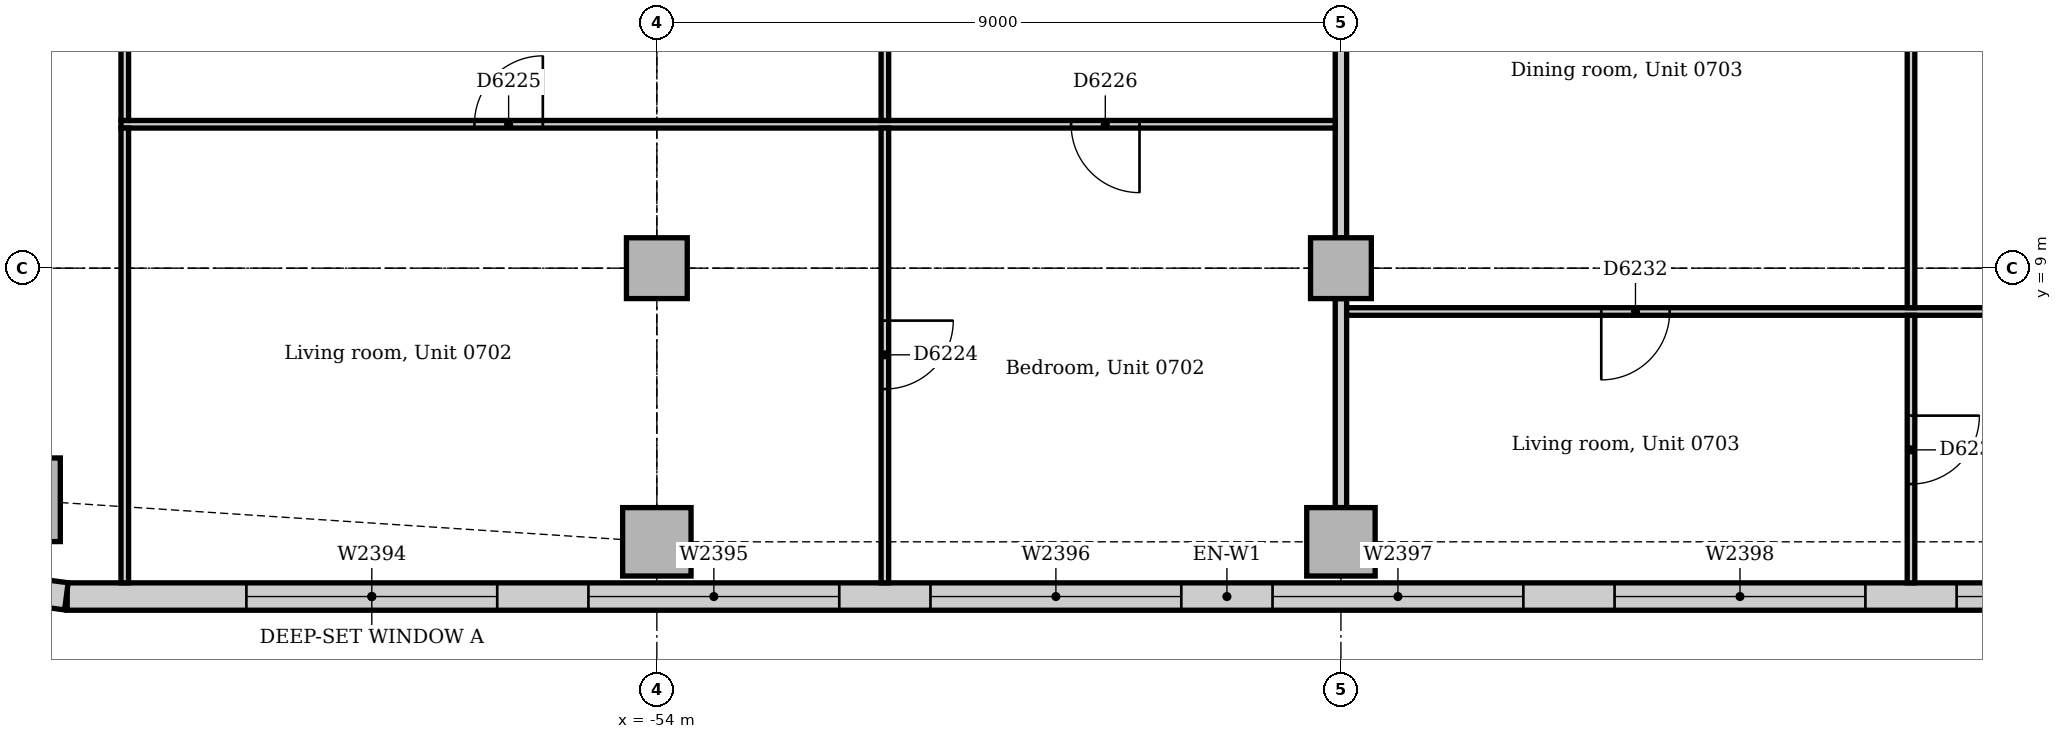
"""IFC4 building model, lengths in metres.
Left out: names, types, materials, properties, quantities, classifications, styles, units other than length and angle.
Written with IfcOpenShell. Run it as: python <this file> out.ifc"""

import sys

from ifc_helpers import new_model, si_unit, direction, frame, frame_2d, origin, origin_2d, place, context, subcontext, project, spatial, rectangle, extrude, element, fill, save


model = new_model("IFC4")
c1 = context("Model", 3, precision=1e-05, world=origin(), true_north=direction((0.0, 1.0)))
c2 = subcontext(c1, "Body", "Model", "MODEL_VIEW")
j1 = project(units=[si_unit("LENGTHUNIT", "METRE"), si_unit("PLANEANGLEUNIT", "RADIAN")], contexts=[c1])
p1 = place(None, origin())
s1 = spatial("IfcSite", under=j1, at=p1, CompositionType="ELEMENT")
p2 = place(p1, origin())
s2 = spatial("IfcBuilding", under=s1, at=p2, CompositionType="ELEMENT")
p3 = place(p2, frame((0.0, 0.0, 34.0)))
s3 = spatial("IfcBuildingStorey", under=s2, at=p3, CompositionType="ELEMENT", Elevation=34.0)
p4 = place(p3, frame((-62.398, 5.953, 0.0), z_axis=(0.0, 0.0, 1.0), x_axis=(1.0, 0.0, 0.0)))
e1 = element("IfcColumn", 1, at=p4, inside=s3, PredefinedType="COLUMN", context=c2, shape_type="SweptSolid", body=[
    extrude(rectangle(XDim=1.1, YDim=1.1, at=origin_2d()), origin(), (0.0, 0.0, 1.0), 3.85),
])
for number, where, z_axis, x_axis in (
    (2, (-54.0, 5.4, 0.0), (0.0, 0.0, 1.0), (1.0, 0.0, 0.0)),
    (3, (-45.0, 5.4, 0.0), (0.0, 0.0, 1.0), (1.0, 0.0, 0.0)),
):
    element("IfcColumn", number, at=place(p3, frame(where, z_axis=z_axis, x_axis=x_axis)), inside=s3, PredefinedType="COLUMN", context=c2, shape_type="SweptSolid", body=[
        extrude(rectangle(XDim=0.9, YDim=0.9, at=origin_2d()), origin(), (0.0, 0.0, 1.0), 3.85),
    ])
for number, where, z_axis, x_axis in (
    (4, (-54.0, 9.0, 0.0), (0.0, 0.0, 1.0), (1.0, 0.0, 0.0)),
    (5, (-45.0, 9.0, 0.0), (0.0, 0.0, 1.0), (1.0, 0.0, 0.0)),
):
    element("IfcColumn", number, at=place(p3, frame(where, z_axis=z_axis, x_axis=x_axis)), inside=s3, PredefinedType="COLUMN", context=c2, shape_type="SweptSolid", body=[
        extrude(rectangle(XDim=0.8, YDim=0.8, at=origin_2d()), origin(), (0.0, 0.0, 1.0), 3.85),
    ])
p5 = place(p3, frame((-61.757, 4.68, 0.0), z_axis=(0.0, 0.0, 1.0), x_axis=(1.0, 0.0, 0.0)))
e6 = element("IfcWall", 6, at=p5, inside=s3, PredefinedType="STANDARD", context=c2, shape_type="SweptSolid", body=[
    extrude(rectangle(XDim=30.515, YDim=0.36, at=frame_2d((15.257, 0.0))), origin(), (0.0, 0.0, 1.0), 3.85),
])
p6 = place(p5, frame((2.357, 0.0, 0.9)))
e7 = element("IfcOpeningElement", 7, at=p6, cuts=e6, PredefinedType="OPENING", context=c2, shape_type="SweptSolid", body=[
    extrude(rectangle(XDim=3.3, YDim=1.6, at=frame_2d((1.65, 0.8))), frame((0.0, 0.19, 0.0), z_axis=(0.0, -1.0, 0.0), x_axis=(1.0, 0.0, 0.0)), (0.0, 0.0, 1.0), 0.38),
])
p7 = place(p5, frame((6.857, 0.0, 0.9)))
e8 = element("IfcOpeningElement", 8, at=p7, cuts=e6, PredefinedType="OPENING", context=c2, shape_type="SweptSolid", body=[
    extrude(rectangle(XDim=3.3, YDim=1.6, at=frame_2d((1.65, 0.8))), frame((0.0, 0.19, 0.0), z_axis=(0.0, -1.0, 0.0), x_axis=(1.0, 0.0, 0.0)), (0.0, 0.0, 1.0), 0.38),
])
p8 = place(p5, frame((11.357, 0.0, 0.9)))
e9 = element("IfcOpeningElement", 9, at=p8, cuts=e6, PredefinedType="OPENING", context=c2, shape_type="SweptSolid", body=[
    extrude(rectangle(XDim=3.3, YDim=1.6, at=frame_2d((1.65, 0.8))), frame((0.0, 0.19, 0.0), z_axis=(0.0, -1.0, 0.0), x_axis=(1.0, 0.0, 0.0)), (0.0, 0.0, 1.0), 0.38),
])
p9 = place(p5, frame((15.857, 0.0, 0.9)))
e10 = element("IfcOpeningElement", 10, at=p9, cuts=e6, PredefinedType="OPENING", context=c2, shape_type="SweptSolid", body=[
    extrude(rectangle(XDim=3.3, YDim=1.6, at=frame_2d((1.65, 0.8))), frame((0.0, 0.19, 0.0), z_axis=(0.0, -1.0, 0.0), x_axis=(1.0, 0.0, 0.0)), (0.0, 0.0, 1.0), 0.38),
])
p10 = place(p5, frame((20.357, 0.0, 0.9)))
e11 = element("IfcOpeningElement", 11, at=p10, cuts=e6, PredefinedType="OPENING", context=c2, shape_type="SweptSolid", body=[
    extrude(rectangle(XDim=3.3, YDim=1.6, at=frame_2d((1.65, 0.8))), frame((0.0, 0.19, 0.0), z_axis=(0.0, -1.0, 0.0), x_axis=(1.0, 0.0, 0.0)), (0.0, 0.0, 1.0), 0.38),
])
p11 = place(p5, frame((24.857, 0.0, 0.9)))
e12 = element("IfcOpeningElement", 12, at=p11, cuts=e6, PredefinedType="OPENING", context=c2, shape_type="SweptSolid", body=[
    extrude(rectangle(XDim=3.3, YDim=1.6, at=frame_2d((1.65, 0.8))), frame((0.0, 0.19, 0.0), z_axis=(0.0, -1.0, 0.0), x_axis=(1.0, 0.0, 0.0)), (0.0, 0.0, 1.0), 0.38),
])
p12 = place(p3, frame((-62.476, 4.776, 0.0), z_axis=(0.0, 0.0, 1.0), x_axis=(0.99144092581, -0.13055608231, 0.0)))
e13 = element("IfcWall", 13, at=p12, inside=s3, PredefinedType="STANDARD", context=c2, shape_type="SweptSolid", body=[
    extrude(rectangle(XDim=0.713, YDim=0.36, at=frame_2d((0.356, 0.0))), origin(), (0.0, 0.0, 1.0), 3.85),
])
p13 = place(p3, frame((-45.0, 9.4, 0.0), z_axis=(0.0, 0.0, 1.0), x_axis=(0.0, 1.0, 0.0)))
e14 = element("IfcWall", 14, at=p13, inside=s3, PredefinedType="PARTITIONING", context=c2, shape_type="SweptSolid", body=[
    extrude(rectangle(XDim=8.2, YDim=0.15, at=frame_2d((4.1, 0.0))), origin(), (0.0, 0.0, 1.0), 3.158),
])
p14 = place(p3, frame((-45.0, 5.85, 0.0), z_axis=(0.0, 0.0, 1.0), x_axis=(0.0, 1.0, 0.0)))
e15 = element("IfcWall", 15, at=p14, inside=s3, PredefinedType="PARTITIONING", context=c2, shape_type="SweptSolid", body=[
    extrude(rectangle(XDim=2.75, YDim=0.15, at=frame_2d((1.375, 0.0))), origin(), (0.0, 0.0, 1.0), 3.652),
])
p15 = place(p3, frame((-44.925, 8.43, 0.0), z_axis=(0.0, 0.0, 1.0), x_axis=(1.0, 0.0, 0.0)))
e16 = element("IfcWall", 16, at=p15, inside=s3, PredefinedType="PARTITIONING", context=c2, shape_type="SweptSolid", body=[
    extrude(rectangle(XDim=15.922, YDim=0.1, at=frame_2d((7.961, 0.0))), origin(), (0.0, 0.0, 1.0), 3.85),
])
p16 = place(p15, frame((3.35, 0.0, 0.0)))
e17 = element("IfcOpeningElement", 17, at=p16, cuts=e16, PredefinedType="OPENING", context=c2, shape_type="SweptSolid", body=[
    extrude(rectangle(XDim=0.9, YDim=2.1, at=frame_2d((0.45, 1.05))), frame((0.0, 0.06, 0.0), z_axis=(0.0, -1.0, 0.0), x_axis=(1.0, 0.0, 0.0)), (0.0, 0.0, 1.0), 0.12),
])
p17 = place(p15, frame((11.125, 0.0, 0.0)))
e18 = element("IfcOpeningElement", 18, at=p17, cuts=e16, PredefinedType="OPENING", context=c2, shape_type="SweptSolid", body=[
    extrude(rectangle(XDim=0.9, YDim=2.1, at=frame_2d((0.45, 1.05))), frame((0.0, 0.06, 0.0), z_axis=(0.0, -1.0, 0.0), x_axis=(1.0, 0.0, 0.0)), (0.0, 0.0, 1.0), 0.12),
])
p18 = place(p3, frame((-61.05, 10.893, 0.0), z_axis=(0.0, 0.0, 1.0), x_axis=(1.0, 0.0, 0.0)))
e19 = element("IfcWall", 19, at=p18, inside=s3, PredefinedType="PARTITIONING", context=c2, shape_type="SweptSolid", body=[
    extrude(rectangle(XDim=15.975, YDim=0.1, at=frame_2d((7.987, 0.0))), origin(), (0.0, 0.0, 1.0), 3.85),
])
p19 = place(p18, frame((4.65, 0.0, 0.0)))
e20 = element("IfcOpeningElement", 20, at=p19, cuts=e19, PredefinedType="OPENING", context=c2, shape_type="SweptSolid", body=[
    extrude(rectangle(XDim=0.9, YDim=2.1, at=frame_2d((0.45, 1.05))), frame((0.0, 0.06, 0.0), z_axis=(0.0, -1.0, 0.0), x_axis=(1.0, 0.0, 0.0)), (0.0, 0.0, 1.0), 0.12),
])
p20 = place(p18, frame((12.5, 0.0, 0.0)))
e21 = element("IfcOpeningElement", 21, at=p20, cuts=e19, PredefinedType="OPENING", context=c2, shape_type="SweptSolid", body=[
    extrude(rectangle(XDim=0.9, YDim=2.1, at=frame_2d((0.45, 1.05))), frame((0.0, 0.06, 0.0), z_axis=(0.0, -1.0, 0.0), x_axis=(1.0, 0.0, 0.0)), (0.0, 0.0, 1.0), 0.12),
])
p21 = place(p3, frame((-61.0, 10.943, 0.0), z_axis=(0.0, 0.0, 1.0), x_axis=(0.0, 1.0, 0.0)))
e22 = element("IfcWall", 22, at=p21, inside=s3, PredefinedType="PARTITIONING", context=c2, shape_type="SweptSolid", body=[
    extrude(rectangle(XDim=3.807, YDim=0.1, at=frame_2d((1.903, 0.0))), origin(), (0.0, 0.0, 1.0), 3.85),
])
p22 = place(p3, frame((-61.0, 4.86, 0.0), z_axis=(0.0, 0.0, 1.0), x_axis=(0.0, 1.0, 0.0)))
e23 = element("IfcWall", 23, at=p22, inside=s3, PredefinedType="PARTITIONING", context=c2, shape_type="SweptSolid", body=[
    extrude(rectangle(XDim=5.983, YDim=0.1, at=frame_2d((2.992, 0.0))), origin(), (0.0, 0.0, 1.0), 3.85),
])
p23 = place(p3, frame((-51.0, 10.943, 0.0), z_axis=(0.0, 0.0, 1.0), x_axis=(0.0, 1.0, 0.0)))
e24 = element("IfcWall", 24, at=p23, inside=s3, PredefinedType="PARTITIONING", context=c2, shape_type="SweptSolid", body=[
    extrude(rectangle(XDim=3.807, YDim=0.1, at=frame_2d((1.903, 0.0))), origin(), (0.0, 0.0, 1.0), 3.85),
])
p24 = place(p3, frame((-51.0, 4.86, 0.0), z_axis=(0.0, 0.0, 1.0), x_axis=(0.0, 1.0, 0.0)))
e25 = element("IfcWall", 25, at=p24, inside=s3, PredefinedType="PARTITIONING", context=c2, shape_type="SweptSolid", body=[
    extrude(rectangle(XDim=5.983, YDim=0.1, at=frame_2d((2.992, 0.0))), origin(), (0.0, 0.0, 1.0), 3.85),
])
p25 = place(p24, frame((2.55, 0.0, 0.0)))
e26 = element("IfcOpeningElement", 26, at=p25, cuts=e25, PredefinedType="OPENING", context=c2, shape_type="SweptSolid", body=[
    extrude(rectangle(XDim=0.9, YDim=2.1, at=frame_2d((0.45, 1.05))), frame((0.0, 0.06, 0.0), z_axis=(0.0, -1.0, 0.0), x_axis=(1.0, 0.0, 0.0)), (0.0, 0.0, 1.0), 0.12),
])
p26 = place(p3, frame((-37.5, 8.48, 0.0), z_axis=(0.0, 0.0, 1.0), x_axis=(0.0, 1.0, 0.0)))
e27 = element("IfcWall", 27, at=p26, inside=s3, PredefinedType="PARTITIONING", context=c2, shape_type="SweptSolid", body=[
    extrude(rectangle(XDim=6.27, YDim=0.1, at=frame_2d((3.135, 0.0))), origin(), (0.0, 0.0, 1.0), 3.85),
])
p27 = place(p3, frame((-37.5, 4.86, 0.0), z_axis=(0.0, 0.0, 1.0), x_axis=(0.0, 1.0, 0.0)))
e28 = element("IfcWall", 28, at=p27, inside=s3, PredefinedType="PARTITIONING", context=c2, shape_type="SweptSolid", body=[
    extrude(rectangle(XDim=3.52, YDim=0.1, at=frame_2d((1.76, 0.0))), origin(), (0.0, 0.0, 1.0), 3.85),
])
p28 = place(p27, frame((1.3, 0.0, 0.0)))
e29 = element("IfcOpeningElement", 29, at=p28, cuts=e28, PredefinedType="OPENING", context=c2, shape_type="SweptSolid", body=[
    extrude(rectangle(XDim=0.9, YDim=2.1, at=frame_2d((0.45, 1.05))), frame((0.0, 0.06, 0.0), z_axis=(0.0, -1.0, 0.0), x_axis=(1.0, 0.0, 0.0)), (0.0, 0.0, 1.0), 0.12),
])
p29 = place(p6, origin())
e30 = element("IfcWindow", 30, at=p29, inside=s3, PartitioningType="SINGLE_PANEL", PredefinedType="WINDOW", context=c2, shape_type="SweptSolid", body=[
    extrude(rectangle(XDim=3.3, YDim=1.6, at=frame_2d((1.65, 0.8))), frame((0.0, 0.13, 0.0), z_axis=(0.0, -1.0, 0.0), x_axis=(1.0, 0.0, 0.0)), (0.0, 0.0, 1.0), 0.06),
])
fill(e7, e30)
p30 = place(p7, origin())
e31 = element("IfcWindow", 31, at=p30, inside=s3, PartitioningType="SINGLE_PANEL", PredefinedType="WINDOW", context=c2, shape_type="SweptSolid", body=[
    extrude(rectangle(XDim=3.3, YDim=1.6, at=frame_2d((1.65, 0.8))), frame((0.0, 0.13, 0.0), z_axis=(0.0, -1.0, 0.0), x_axis=(1.0, 0.0, 0.0)), (0.0, 0.0, 1.0), 0.06),
])
fill(e8, e31)
p31 = place(p8, origin())
e32 = element("IfcWindow", 32, at=p31, inside=s3, PartitioningType="SINGLE_PANEL", PredefinedType="WINDOW", context=c2, shape_type="SweptSolid", body=[
    extrude(rectangle(XDim=3.3, YDim=1.6, at=frame_2d((1.65, 0.8))), frame((0.0, 0.13, 0.0), z_axis=(0.0, -1.0, 0.0), x_axis=(1.0, 0.0, 0.0)), (0.0, 0.0, 1.0), 0.06),
])
fill(e9, e32)
p32 = place(p9, origin())
e33 = element("IfcWindow", 33, at=p32, inside=s3, PartitioningType="SINGLE_PANEL", PredefinedType="WINDOW", context=c2, shape_type="SweptSolid", body=[
    extrude(rectangle(XDim=3.3, YDim=1.6, at=frame_2d((1.65, 0.8))), frame((0.0, 0.13, 0.0), z_axis=(0.0, -1.0, 0.0), x_axis=(1.0, 0.0, 0.0)), (0.0, 0.0, 1.0), 0.06),
])
fill(e10, e33)
p33 = place(p10, origin())
e34 = element("IfcWindow", 34, at=p33, inside=s3, PartitioningType="SINGLE_PANEL", PredefinedType="WINDOW", context=c2, shape_type="SweptSolid", body=[
    extrude(rectangle(XDim=3.3, YDim=1.6, at=frame_2d((1.65, 0.8))), frame((0.0, 0.13, 0.0), z_axis=(0.0, -1.0, 0.0), x_axis=(1.0, 0.0, 0.0)), (0.0, 0.0, 1.0), 0.06),
])
fill(e11, e34)
p34 = place(p11, origin())
e35 = element("IfcWindow", 35, at=p34, inside=s3, PartitioningType="SINGLE_PANEL", PredefinedType="WINDOW", context=c2, shape_type="SweptSolid", body=[
    extrude(rectangle(XDim=3.3, YDim=1.6, at=frame_2d((1.65, 0.8))), frame((0.0, 0.13, 0.0), z_axis=(0.0, -1.0, 0.0), x_axis=(1.0, 0.0, 0.0)), (0.0, 0.0, 1.0), 0.06),
])
fill(e12, e35)
p35 = place(p25, frame((0.9, 0.0, 0.0), z_axis=(0.0, 0.0, 1.0), x_axis=(-1.0, 0.0, 0.0)))
e36 = element("IfcDoor", 36, at=p35, inside=s3, OperationType="SINGLE_SWING_LEFT", PredefinedType="DOOR", context=c2, shape_type="SweptSolid", body=[
    extrude(rectangle(XDim=0.9, YDim=2.1, at=frame_2d((0.45, 1.05))), frame((0.0, 0.025, 0.0), z_axis=(0.0, -1.0, 0.0), x_axis=(1.0, 0.0, 0.0)), (0.0, 0.0, 1.0), 0.05),
])
fill(e26, e36)
p36 = place(p19, origin())
e37 = element("IfcDoor", 37, at=p36, inside=s3, OperationType="SINGLE_SWING_RIGHT", PredefinedType="DOOR", context=c2, shape_type="SweptSolid", body=[
    extrude(rectangle(XDim=0.9, YDim=2.1, at=frame_2d((0.45, 1.05))), frame((0.0, 0.025, 0.0), z_axis=(0.0, -1.0, 0.0), x_axis=(1.0, 0.0, 0.0)), (0.0, 0.0, 1.0), 0.05),
])
fill(e20, e37)
p37 = place(p20, frame((0.9, 0.0, 0.0), z_axis=(0.0, 0.0, 1.0), x_axis=(-1.0, 0.0, 0.0)))
e38 = element("IfcDoor", 38, at=p37, inside=s3, OperationType="SINGLE_SWING_LEFT", PredefinedType="DOOR", context=c2, shape_type="SweptSolid", body=[
    extrude(rectangle(XDim=0.9, YDim=2.1, at=frame_2d((0.45, 1.05))), frame((0.0, 0.025, 0.0), z_axis=(0.0, -1.0, 0.0), x_axis=(1.0, 0.0, 0.0)), (0.0, 0.0, 1.0), 0.05),
])
fill(e21, e38)
p38 = place(p28, frame((0.9, 0.0, 0.0), z_axis=(0.0, 0.0, 1.0), x_axis=(-1.0, 0.0, 0.0)))
e39 = element("IfcDoor", 39, at=p38, inside=s3, OperationType="SINGLE_SWING_LEFT", PredefinedType="DOOR", context=c2, shape_type="SweptSolid", body=[
    extrude(rectangle(XDim=0.9, YDim=2.1, at=frame_2d((0.45, 1.05))), frame((0.0, 0.025, 0.0), z_axis=(0.0, -1.0, 0.0), x_axis=(1.0, 0.0, 0.0)), (0.0, 0.0, 1.0), 0.05),
])
fill(e29, e39)
p39 = place(p16, frame((0.9, 0.0, 0.0), z_axis=(0.0, 0.0, 1.0), x_axis=(-1.0, 0.0, 0.0)))
e40 = element("IfcDoor", 40, at=p39, inside=s3, OperationType="SINGLE_SWING_RIGHT", PredefinedType="DOOR", context=c2, shape_type="SweptSolid", body=[
    extrude(rectangle(XDim=0.9, YDim=2.1, at=frame_2d((0.45, 1.05))), frame((0.0, 0.025, 0.0), z_axis=(0.0, -1.0, 0.0), x_axis=(1.0, 0.0, 0.0)), (0.0, 0.0, 1.0), 0.05),
])
fill(e17, e40)
save(model, sys.argv[1])
